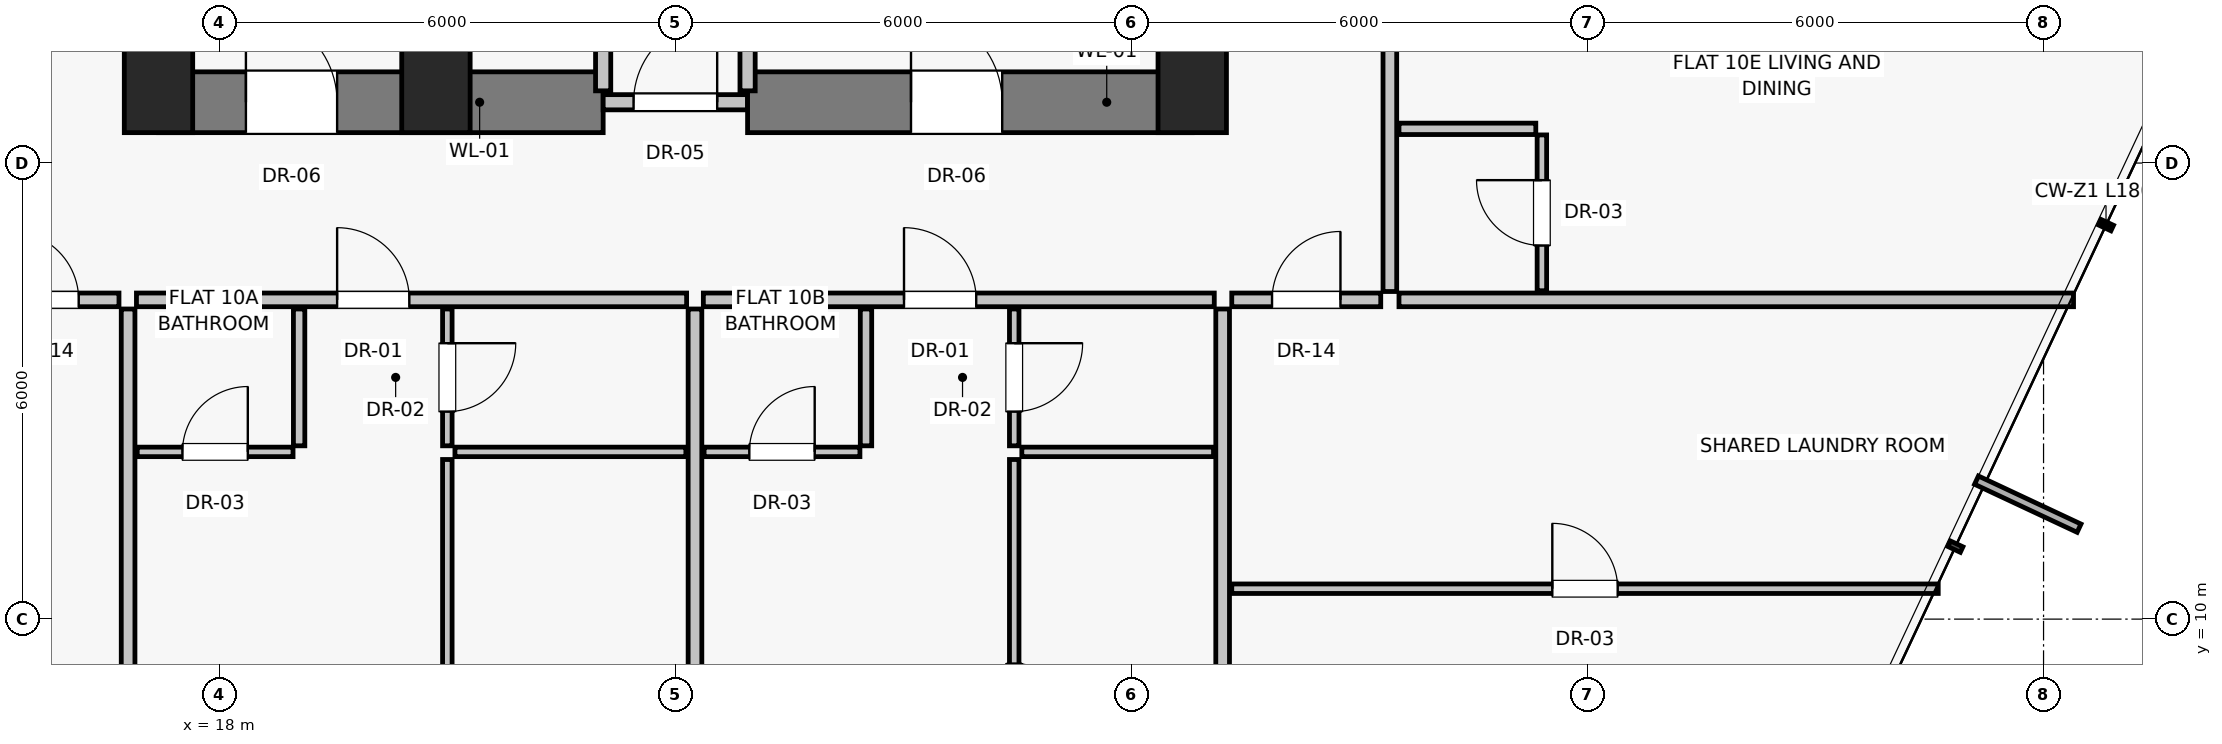
"""IFC4 building model, lengths in metres.
Left out: names, types, materials, properties, quantities, classifications, styles, units other than length and angle.
Written with IfcOpenShell. Run it as: python <this file> out.ifc"""

import sys

from ifc_helpers import new_model, si_unit, direction, frame, frame_2d, origin, origin_2d, place, context, subcontext, project, spatial, rectangle, extrude, source, transform, mapped, element, fill, save


model = new_model("IFC4")
c1 = context("Model", 3, precision=1e-05, world=origin(), true_north=direction((0.0, 1.0)))
c2 = subcontext(c1, "Body", "Model", "MODEL_VIEW")
j1 = project(units=[si_unit("LENGTHUNIT", "METRE"), si_unit("PLANEANGLEUNIT", "RADIAN")], contexts=[c1])
p1 = place(None, origin())
s1 = spatial("IfcSite", under=j1, at=p1, CompositionType="ELEMENT")
p2 = place(p1, origin())
s2 = spatial("IfcBuilding", under=s1, at=p2, CompositionType="ELEMENT")
p3 = place(p2, frame((0.0, 0.0, 40.3)))
s3 = spatial("IfcBuildingStorey", under=s2, at=p3, CompositionType="ELEMENT", Elevation=40.3)
for number, where, z_axis, x_axis in (
    (1, (17.2, 17.0, 0.0), (0.0, 0.0, 1.0), (1.0, 0.0, 0.0)),
    (2, (20.85, 17.0, 0.0), (0.0, 0.0, 1.0), (1.0, 0.0, 0.0)),
    (3, (30.8, 17.0, 0.0), (0.0, 0.0, 1.0), (1.0, 0.0, 0.0)),
):
    element("IfcColumn", number, at=place(p3, frame(where, z_axis=z_axis, x_axis=x_axis)), inside=s3, PredefinedType="PILASTER", context=c2, shape_type="SweptSolid", body=[
        extrude(rectangle(XDim=0.9, YDim=1.2, at=origin_2d()), origin(), (0.0, 0.0, 1.0), 3.25),
    ])
for number, where, z_axis, x_axis in (
    (4, (17.2, 16.8, 0.0), (0.0, 0.0, 1.0), (0.0, 1.0, 0.0)),
    (5, (30.8, 16.8, 0.0), (0.0, 0.0, 1.0), (0.0, 1.0, 0.0)),
):
    element("IfcWall", number, at=place(p3, frame(where, z_axis=z_axis, x_axis=x_axis)), inside=s3, PredefinedType="SHEAR", context=c2, shape_type="SweptSolid", body=[
        extrude(rectangle(XDim=14.2, YDim=0.8, at=frame_2d((7.1, 0.0))), origin(), (0.0, 0.0, 1.0), 3.0),
    ])
p4 = place(p3, frame((17.2, 16.8, 0.0), z_axis=(0.0, 0.0, 1.0), x_axis=(1.0, 0.0, 0.0)))
e6 = element("IfcWall", 6, at=p4, inside=s3, PredefinedType="SHEAR", context=c2, shape_type="SweptSolid", body=[
    extrude(rectangle(XDim=5.85, YDim=0.8, at=frame_2d((2.925, 0.0))), origin(), (0.0, 0.0, 1.0), 3.0),
])
p5 = place(p4, frame((1.15, 0.0, 0.0)))
e7 = element("IfcOpeningElement", 7, at=p5, cuts=e6, PredefinedType="OPENING", context=c2, shape_type="SweptSolid", body=[
    extrude(rectangle(XDim=1.2, YDim=2.03, at=frame_2d((0.6, 1.015))), frame((0.0, 0.41, 0.0), z_axis=(0.0, -1.0, 0.0), x_axis=(1.0, 0.0, 0.0)), (0.0, 0.0, 1.0), 0.82),
])
p6 = place(p3, frame((23.05, 16.8, 0.0), z_axis=(0.0, 0.0, 1.0), x_axis=(1.0, 0.0, 0.0)))
e8 = element("IfcWall", 8, at=p6, inside=s3, PredefinedType="SOLIDWALL", context=c2, shape_type="SweptSolid", body=[
    extrude(rectangle(XDim=1.9, YDim=0.2, at=frame_2d((0.95, 0.0))), origin(), (0.0, 0.0, 1.0), 2.15),
])
p7 = place(p6, frame((0.4, 0.0, 0.0)))
e9 = element("IfcOpeningElement", 9, at=p7, cuts=e8, PredefinedType="OPENING", context=c2, shape_type="SweptSolid", body=[
    extrude(rectangle(XDim=1.1, YDim=2.03, at=frame_2d((0.55, 1.015))), frame((0.0, 0.11, 0.0), z_axis=(0.0, -1.0, 0.0), x_axis=(1.0, 0.0, 0.0)), (0.0, 0.0, 1.0), 0.22),
])
p8 = place(p3, frame((24.95, 16.8, 0.0), z_axis=(0.0, 0.0, 1.0), x_axis=(1.0, 0.0, 0.0)))
e10 = element("IfcWall", 10, at=p8, inside=s3, PredefinedType="SHEAR", context=c2, shape_type="SweptSolid", body=[
    extrude(rectangle(XDim=5.85, YDim=0.8, at=frame_2d((2.925, 0.0))), origin(), (0.0, 0.0, 1.0), 3.0),
])
p9 = place(p8, frame((2.15, 0.0, 0.0)))
e11 = element("IfcOpeningElement", 11, at=p9, cuts=e10, PredefinedType="OPENING", context=c2, shape_type="SweptSolid", body=[
    extrude(rectangle(XDim=1.2, YDim=2.03, at=frame_2d((0.6, 1.015))), frame((0.0, 0.41, 0.0), z_axis=(0.0, -1.0, 0.0), x_axis=(1.0, 0.0, 0.0)), (0.0, 0.0, 1.0), 0.82),
])
for number, where, z_axis, x_axis in (
    (12, (23.05, 16.95, 0.0), (0.0, 0.0, 1.0), (0.0, 1.0, 0.0)),
    (13, (24.95, 16.95, 0.0), (0.0, 0.0, 1.0), (0.0, 1.0, 0.0)),
):
    element("IfcWall", number, at=place(p3, frame(where, z_axis=z_axis, x_axis=x_axis)), inside=s3, PredefinedType="SOLIDWALL", context=c2, shape_type="SweptSolid", body=[
        extrude(rectangle(XDim=5.6, YDim=0.2, at=frame_2d((2.8, 0.0))), origin(), (0.0, 0.0, 1.0), 3.0),
    ])
p10 = place(p3, frame((16.8, 14.08, 0.0), z_axis=(0.0, 0.0, 1.0), x_axis=(0.0, -1.0, 0.0)))
e14 = element("IfcWall", 14, at=p10, inside=s3, PredefinedType="PARTITIONING", context=c2, shape_type="SweptSolid", body=[
    extrude(rectangle(XDim=11.588, YDim=0.18, at=frame_2d((5.794, 0.0))), origin(), (0.0, 0.0, 1.0), 3.0),
])
p11 = place(p3, frame((31.2, 14.08, 0.0), z_axis=(0.0, 0.0, 1.0), x_axis=(0.0, -1.0, 0.0)))
e15 = element("IfcWall", 15, at=p11, inside=s3, PredefinedType="PARTITIONING", context=c2, shape_type="SweptSolid", body=[
    extrude(rectangle(XDim=10.354, YDim=0.18, at=frame_2d((5.177, 0.0))), origin(), (0.0, 0.0, 1.0), 3.0),
])
p12 = place(p3, frame((16.91, 14.2, 0.0), z_axis=(0.0, 0.0, 1.0), x_axis=(1.0, 0.0, 0.0)))
e16 = element("IfcWall", 16, at=p12, inside=s3, PredefinedType="PARTITIONING", context=c2, shape_type="SweptSolid", body=[
    extrude(rectangle(XDim=7.238, YDim=0.18, at=frame_2d((3.619, 0.0))), origin(), (0.0, 0.0, 1.0), 3.0),
])
p13 = place(p12, frame((2.64, 0.0, 0.0)))
e17 = element("IfcOpeningElement", 17, at=p13, cuts=e16, PredefinedType="OPENING", context=c2, shape_type="SweptSolid", body=[
    extrude(rectangle(XDim=0.95, YDim=2.02, at=frame_2d((0.475, 1.01))), frame((0.0, 0.1, 0.0), z_axis=(0.0, -1.0, 0.0), x_axis=(1.0, 0.0, 0.0)), (0.0, 0.0, 1.0), 0.2),
])
p14 = place(p3, frame((19.05, 14.08, 0.0), z_axis=(0.0, 0.0, 1.0), x_axis=(0.0, -1.0, 0.0)))
e18 = element("IfcWall", 18, at=p14, inside=s3, PredefinedType="PARTITIONING", context=c2, shape_type="SweptSolid", body=[
    extrude(rectangle(XDim=1.8, YDim=0.15, at=frame_2d((0.9, 0.0))), origin(), (0.0, 0.0, 1.0), 3.0),
])
p15 = place(p3, frame((16.92, 12.2, 0.0), z_axis=(0.0, 0.0, 1.0), x_axis=(1.0, 0.0, 0.0)))
e19 = element("IfcWall", 19, at=p15, inside=s3, PredefinedType="PARTITIONING", context=c2, shape_type="SweptSolid", body=[
    extrude(rectangle(XDim=2.05, YDim=0.125, at=frame_2d((1.025, 0.0))), origin(), (0.0, 0.0, 1.0), 3.0),
])
p16 = place(p15, frame((0.595, 0.0, 0.0)))
e20 = element("IfcOpeningElement", 20, at=p16, cuts=e19, PredefinedType="OPENING", context=c2, shape_type="SweptSolid", body=[
    extrude(rectangle(XDim=0.86, YDim=2.01, at=frame_2d((0.43, 1.005))), frame((0.0, 0.073, 0.0), z_axis=(0.0, -1.0, 0.0), x_axis=(1.0, 0.0, 0.0)), (0.0, 0.0, 1.0), 0.145),
])
p17 = place(p3, frame((21.0, 14.08, 0.0), z_axis=(0.0, 0.0, 1.0), x_axis=(0.0, -1.0, 0.0)))
e21 = element("IfcWall", 21, at=p17, inside=s3, PredefinedType="PARTITIONING", context=c2, shape_type="SweptSolid", body=[
    extrude(rectangle(XDim=1.8, YDim=0.125, at=frame_2d((0.9, 0.0))), origin(), (0.0, 0.0, 1.0), 3.0),
])
p18 = place(p17, frame((0.45, 0.0, 0.0)))
e22 = element("IfcOpeningElement", 22, at=p18, cuts=e21, PredefinedType="OPENING", context=c2, shape_type="SweptSolid", body=[
    extrude(rectangle(XDim=0.9, YDim=2.01, at=frame_2d((0.45, 1.005))), frame((0.0, 0.073, 0.0), z_axis=(0.0, -1.0, 0.0), x_axis=(1.0, 0.0, 0.0)), (0.0, 0.0, 1.0), 0.145),
])
p19 = place(p3, frame((21.1, 12.2, 0.0), z_axis=(0.0, 0.0, 1.0), x_axis=(1.0, 0.0, 0.0)))
e23 = element("IfcWall", 23, at=p19, inside=s3, PredefinedType="PARTITIONING", context=c2, shape_type="SweptSolid", body=[
    extrude(rectangle(XDim=3.038, YDim=0.125, at=frame_2d((1.519, 0.0))), origin(), (0.0, 0.0, 1.0), 3.0),
])
p20 = place(p3, frame((21.0, 12.1, 0.0), z_axis=(0.0, 0.0, 1.0), x_axis=(0.0, -1.0, 0.0)))
e24 = element("IfcWall", 24, at=p20, inside=s3, PredefinedType="PARTITIONING", context=c2, shape_type="SweptSolid", body=[
    extrude(rectangle(XDim=9.248, YDim=0.125, at=frame_2d((4.624, 0.0))), origin(), (0.0, 0.0, 1.0), 3.0),
])
p21 = place(p20, frame((2.902, 0.0, 0.0)))
e25 = element("IfcOpeningElement", 25, at=p21, cuts=e24, PredefinedType="OPENING", context=c2, shape_type="SweptSolid", body=[
    extrude(rectangle(XDim=0.9, YDim=2.01, at=frame_2d((0.45, 1.005))), frame((0.0, 0.073, 0.0), z_axis=(0.0, -1.0, 0.0), x_axis=(1.0, 0.0, 0.0)), (0.0, 0.0, 1.0), 0.145),
])
p22 = place(p3, frame((24.258, 14.08, 0.0), z_axis=(0.0, 0.0, 1.0), x_axis=(0.0, -1.0, 0.0)))
e26 = element("IfcWall", 26, at=p22, inside=s3, PredefinedType="PARTITIONING", context=c2, shape_type="SweptSolid", body=[
    extrude(rectangle(XDim=10.949, YDim=0.18, at=frame_2d((5.475, 0.0))), origin(), (0.0, 0.0, 1.0), 3.0),
])
p23 = place(p3, frame((24.368, 14.2, 0.0), z_axis=(0.0, 0.0, 1.0), x_axis=(1.0, 0.0, 0.0)))
e27 = element("IfcWall", 27, at=p23, inside=s3, PredefinedType="PARTITIONING", context=c2, shape_type="SweptSolid", body=[
    extrude(rectangle(XDim=6.722, YDim=0.18, at=frame_2d((3.361, 0.0))), origin(), (0.0, 0.0, 1.0), 3.0),
])
p24 = place(p23, frame((2.64, 0.0, 0.0)))
e28 = element("IfcOpeningElement", 28, at=p24, cuts=e27, PredefinedType="OPENING", context=c2, shape_type="SweptSolid", body=[
    extrude(rectangle(XDim=0.95, YDim=2.02, at=frame_2d((0.475, 1.01))), frame((0.0, 0.1, 0.0), z_axis=(0.0, -1.0, 0.0), x_axis=(1.0, 0.0, 0.0)), (0.0, 0.0, 1.0), 0.2),
])
p25 = place(p3, frame((26.508, 14.08, 0.0), z_axis=(0.0, 0.0, 1.0), x_axis=(0.0, -1.0, 0.0)))
e29 = element("IfcWall", 29, at=p25, inside=s3, PredefinedType="PARTITIONING", context=c2, shape_type="SweptSolid", body=[
    extrude(rectangle(XDim=1.8, YDim=0.15, at=frame_2d((0.9, 0.0))), origin(), (0.0, 0.0, 1.0), 3.0),
])
p26 = place(p3, frame((24.378, 12.2, 0.0), z_axis=(0.0, 0.0, 1.0), x_axis=(1.0, 0.0, 0.0)))
e30 = element("IfcWall", 30, at=p26, inside=s3, PredefinedType="PARTITIONING", context=c2, shape_type="SweptSolid", body=[
    extrude(rectangle(XDim=2.05, YDim=0.125, at=frame_2d((1.025, 0.0))), origin(), (0.0, 0.0, 1.0), 3.0),
])
p27 = place(p26, frame((0.595, 0.0, 0.0)))
e31 = element("IfcOpeningElement", 31, at=p27, cuts=e30, PredefinedType="OPENING", context=c2, shape_type="SweptSolid", body=[
    extrude(rectangle(XDim=0.86, YDim=2.01, at=frame_2d((0.43, 1.005))), frame((0.0, 0.073, 0.0), z_axis=(0.0, -1.0, 0.0), x_axis=(1.0, 0.0, 0.0)), (0.0, 0.0, 1.0), 0.145),
])
p28 = place(p3, frame((28.458, 14.08, 0.0), z_axis=(0.0, 0.0, 1.0), x_axis=(0.0, -1.0, 0.0)))
e32 = element("IfcWall", 32, at=p28, inside=s3, PredefinedType="PARTITIONING", context=c2, shape_type="SweptSolid", body=[
    extrude(rectangle(XDim=1.8, YDim=0.125, at=frame_2d((0.9, 0.0))), origin(), (0.0, 0.0, 1.0), 3.0),
])
p29 = place(p28, frame((0.45, 0.0, 0.0)))
e33 = element("IfcOpeningElement", 33, at=p29, cuts=e32, PredefinedType="OPENING", context=c2, shape_type="SweptSolid", body=[
    extrude(rectangle(XDim=0.9, YDim=2.01, at=frame_2d((0.45, 1.005))), frame((0.0, 0.073, 0.0), z_axis=(0.0, -1.0, 0.0), x_axis=(1.0, 0.0, 0.0)), (0.0, 0.0, 1.0), 0.145),
])
p30 = place(p3, frame((28.558, 12.2, 0.0), z_axis=(0.0, 0.0, 1.0), x_axis=(1.0, 0.0, 0.0)))
e34 = element("IfcWall", 34, at=p30, inside=s3, PredefinedType="PARTITIONING", context=c2, shape_type="SweptSolid", body=[
    extrude(rectangle(XDim=2.522, YDim=0.125, at=frame_2d((1.261, 0.0))), origin(), (0.0, 0.0, 1.0), 3.0),
])
p31 = place(p3, frame((28.458, 12.1, 0.0), z_axis=(0.0, 0.0, 1.0), x_axis=(0.0, -1.0, 0.0)))
e35 = element("IfcWall", 35, at=p31, inside=s3, PredefinedType="PARTITIONING", context=c2, shape_type="SweptSolid", body=[
    extrude(rectangle(XDim=8.609, YDim=0.125, at=frame_2d((4.304, 0.0))), origin(), (0.0, 0.0, 1.0), 3.0),
])
p32 = place(p31, frame((2.685, 0.0, 0.0)))
e36 = element("IfcOpeningElement", 36, at=p32, cuts=e35, PredefinedType="OPENING", context=c2, shape_type="SweptSolid", body=[
    extrude(rectangle(XDim=0.9, YDim=2.01, at=frame_2d((0.45, 1.005))), frame((0.0, 0.073, 0.0), z_axis=(0.0, -1.0, 0.0), x_axis=(1.0, 0.0, 0.0)), (0.0, 0.0, 1.0), 0.145),
])
p33 = place(p3, frame((33.52, 14.2, 0.0), z_axis=(0.0, 0.0, 1.0), x_axis=(1.0, 0.0, 0.0)))
e37 = element("IfcWall", 37, at=p33, inside=s3, PredefinedType="PARTITIONING", context=c2, shape_type="SweptSolid", body=[
    extrude(rectangle(XDim=8.875, YDim=0.18, at=frame_2d((4.437, 0.0))), origin(), (0.0, 0.0, 1.0), 3.0),
])
p34 = place(p3, frame((33.4, 14.31, 0.0), z_axis=(0.0, 0.0, 1.0), x_axis=(0.0, 1.0, 0.0)))
e38 = element("IfcWall", 38, at=p34, inside=s3, PredefinedType="PARTITIONING", context=c2, shape_type="SweptSolid", body=[
    extrude(rectangle(XDim=10.088, YDim=0.18, at=frame_2d((5.044, 0.0))), origin(), (0.0, 0.0, 1.0), 3.0),
])
p35 = place(p34, frame((3.426, 0.0, 0.0)))
e39 = element("IfcOpeningElement", 39, at=p35, cuts=e38, PredefinedType="OPENING", context=c2, shape_type="SweptSolid", body=[
    extrude(rectangle(XDim=0.95, YDim=2.02, at=frame_2d((0.475, 1.01))), frame((0.0, 0.1, 0.0), z_axis=(0.0, -1.0, 0.0), x_axis=(1.0, 0.0, 0.0)), (0.0, 0.0, 1.0), 0.2),
])
p36 = place(p3, frame((33.52, 16.45, 0.0), z_axis=(0.0, 0.0, 1.0), x_axis=(1.0, 0.0, 0.0)))
e40 = element("IfcWall", 40, at=p36, inside=s3, PredefinedType="PARTITIONING", context=c2, shape_type="SweptSolid", body=[
    extrude(rectangle(XDim=1.8, YDim=0.15, at=frame_2d((0.9, 0.0))), origin(), (0.0, 0.0, 1.0), 3.0),
])
p37 = place(p3, frame((35.4, 14.32, 0.0), z_axis=(0.0, 0.0, 1.0), x_axis=(0.0, 1.0, 0.0)))
e41 = element("IfcWall", 41, at=p37, inside=s3, PredefinedType="PARTITIONING", context=c2, shape_type="SweptSolid", body=[
    extrude(rectangle(XDim=2.05, YDim=0.125, at=frame_2d((1.025, 0.0))), origin(), (0.0, 0.0, 1.0), 3.0),
])
p38 = place(p37, frame((0.595, 0.0, 0.0)))
e42 = element("IfcOpeningElement", 42, at=p38, cuts=e41, PredefinedType="OPENING", context=c2, shape_type="SweptSolid", body=[
    extrude(rectangle(XDim=0.86, YDim=2.01, at=frame_2d((0.43, 1.005))), frame((0.0, 0.073, 0.0), z_axis=(0.0, -1.0, 0.0), x_axis=(1.0, 0.0, 0.0)), (0.0, 0.0, 1.0), 0.145),
])
p39 = place(p3, frame((14.72, 14.2, 0.0), z_axis=(0.0, 0.0, 1.0), x_axis=(1.0, 0.0, 0.0)))
e43 = element("IfcWall", 43, at=p39, inside=s3, PredefinedType="PARTITIONING", context=c2, shape_type="SweptSolid", body=[
    extrude(rectangle(XDim=1.96, YDim=0.18, at=frame_2d((0.98, 0.0))), origin(), (0.0, 0.0, 1.0), 3.0),
])
p40 = place(p39, frame((0.53, 0.0, 0.0)))
e44 = element("IfcOpeningElement", 44, at=p40, cuts=e43, PredefinedType="OPENING", context=c2, shape_type="SweptSolid", body=[
    extrude(rectangle(XDim=0.9, YDim=2.01, at=frame_2d((0.45, 1.005))), frame((0.0, 0.1, 0.0), z_axis=(0.0, -1.0, 0.0), x_axis=(1.0, 0.0, 0.0)), (0.0, 0.0, 1.0), 0.2),
])
p41 = place(p3, frame((31.32, 14.2, 0.0), z_axis=(0.0, 0.0, 1.0), x_axis=(1.0, 0.0, 0.0)))
e45 = element("IfcWall", 45, at=p41, inside=s3, PredefinedType="PARTITIONING", context=c2, shape_type="SweptSolid", body=[
    extrude(rectangle(XDim=1.96, YDim=0.18, at=frame_2d((0.98, 0.0))), origin(), (0.0, 0.0, 1.0), 3.0),
])
p42 = place(p41, frame((0.53, 0.0, 0.0)))
e46 = element("IfcOpeningElement", 46, at=p42, cuts=e45, PredefinedType="OPENING", context=c2, shape_type="SweptSolid", body=[
    extrude(rectangle(XDim=0.9, YDim=2.01, at=frame_2d((0.45, 1.005))), frame((0.0, 0.1, 0.0), z_axis=(0.0, -1.0, 0.0), x_axis=(1.0, 0.0, 0.0)), (0.0, 0.0, 1.0), 0.2),
])
p43 = place(p3, frame((31.32, 10.4, 0.0), z_axis=(0.0, 0.0, 1.0), x_axis=(1.0, 0.0, 0.0)))
e47 = element("IfcWall", 47, at=p43, inside=s3, PredefinedType="PARTITIONING", context=c2, shape_type="SweptSolid", body=[
    extrude(rectangle(XDim=9.294, YDim=0.125, at=frame_2d((4.647, 0.0))), origin(), (0.0, 0.0, 1.0), 3.0),
])
p44 = place(p43, frame((4.217, 0.0, 0.0)))
e48 = element("IfcOpeningElement", 48, at=p44, cuts=e47, PredefinedType="OPENING", context=c2, shape_type="SweptSolid", body=[
    extrude(rectangle(XDim=0.86, YDim=2.01, at=frame_2d((0.43, 1.005))), frame((0.0, 0.073, 0.0), z_axis=(0.0, -1.0, 0.0), x_axis=(1.0, 0.0, 0.0)), (0.0, 0.0, 1.0), 0.145),
])
m1 = source(origin(), c2, "Body", "SweptSolid", [
    extrude(rectangle(XDim=1.2, YDim=2.03, at=frame_2d((0.6, 1.015))), frame((0.0, 0.025, 0.0), z_axis=(0.0, -1.0, 0.0), x_axis=(1.0, 0.0, 0.0)), (0.0, 0.0, 1.0), 0.05),
])
p45 = place(p5, origin())
e49 = element("IfcDoor", 49, at=p45, inside=s3, OperationType="SINGLE_SWING_LEFT", PredefinedType="DOOR", context=c2, shape_type="MappedRepresentation", body=[
    mapped(m1, transform((0.0, 0.0, 0.0), scale=1.0)),
])
fill(e7, e49)
m2 = source(origin(), c2, "Body", "SweptSolid", [
    extrude(rectangle(XDim=1.1, YDim=2.03, at=frame_2d((0.55, 1.015))), frame((0.0, 0.025, 0.0), z_axis=(0.0, -1.0, 0.0), x_axis=(1.0, 0.0, 0.0)), (0.0, 0.0, 1.0), 0.05),
])
p46 = place(p7, origin())
e50 = element("IfcDoor", 50, at=p46, inside=s3, OperationType="SINGLE_SWING_RIGHT", PredefinedType="DOOR", context=c2, shape_type="MappedRepresentation", body=[
    mapped(m2, transform((0.0, 0.0, 0.0), scale=1.0)),
])
fill(e9, e50)
p47 = place(p9, origin())
e51 = element("IfcDoor", 51, at=p47, inside=s3, OperationType="SINGLE_SWING_LEFT", PredefinedType="DOOR", context=c2, shape_type="MappedRepresentation", body=[
    mapped(m1, transform((0.0, 0.0, 0.0), scale=1.0)),
])
fill(e11, e51)
m3 = source(origin(), c2, "Body", "SweptSolid", [
    extrude(rectangle(XDim=0.95, YDim=2.02, at=frame_2d((0.475, 1.01))), frame((0.0, 0.025, 0.0), z_axis=(0.0, -1.0, 0.0), x_axis=(1.0, 0.0, 0.0)), (0.0, 0.0, 1.0), 0.05),
])
p48 = place(p13, origin())
e52 = element("IfcDoor", 52, at=p48, inside=s3, OperationType="SINGLE_SWING_LEFT", PredefinedType="DOOR", context=c2, shape_type="MappedRepresentation", body=[
    mapped(m3, transform((0.0, 0.0, 0.0), scale=1.0)),
])
fill(e17, e52)
m4 = source(origin(), c2, "Body", "SweptSolid", [
    extrude(rectangle(XDim=0.86, YDim=2.01, at=frame_2d((0.43, 1.005))), frame((0.0, 0.025, 0.0), z_axis=(0.0, -1.0, 0.0), x_axis=(1.0, 0.0, 0.0)), (0.0, 0.0, 1.0), 0.05),
])
p49 = place(p16, origin())
e53 = element("IfcDoor", 53, at=p49, inside=s3, OperationType="SINGLE_SWING_RIGHT", PredefinedType="DOOR", context=c2, shape_type="MappedRepresentation", body=[
    mapped(m4, transform((0.0, 0.0, 0.0), scale=1.0)),
])
fill(e20, e53)
m5 = source(origin(), c2, "Body", "SweptSolid", [
    extrude(rectangle(XDim=0.9, YDim=2.01, at=frame_2d((0.45, 1.005))), frame((0.0, 0.025, 0.0), z_axis=(0.0, -1.0, 0.0), x_axis=(1.0, 0.0, 0.0)), (0.0, 0.0, 1.0), 0.05),
])
p50 = place(p18, origin())
e54 = element("IfcDoor", 54, at=p50, inside=s3, OperationType="SINGLE_SWING_LEFT", PredefinedType="DOOR", context=c2, shape_type="MappedRepresentation", body=[
    mapped(m5, transform((0.0, 0.0, 0.0), scale=1.0)),
])
fill(e22, e54)
p51 = place(p24, origin())
e55 = element("IfcDoor", 55, at=p51, inside=s3, OperationType="SINGLE_SWING_LEFT", PredefinedType="DOOR", context=c2, shape_type="MappedRepresentation", body=[
    mapped(m3, transform((0.0, 0.0, 0.0), scale=1.0)),
])
fill(e28, e55)
p52 = place(p27, origin())
e56 = element("IfcDoor", 56, at=p52, inside=s3, OperationType="SINGLE_SWING_RIGHT", PredefinedType="DOOR", context=c2, shape_type="MappedRepresentation", body=[
    mapped(m4, transform((0.0, 0.0, 0.0), scale=1.0)),
])
fill(e31, e56)
p53 = place(p29, origin())
e57 = element("IfcDoor", 57, at=p53, inside=s3, OperationType="SINGLE_SWING_LEFT", PredefinedType="DOOR", context=c2, shape_type="MappedRepresentation", body=[
    mapped(m5, transform((0.0, 0.0, 0.0), scale=1.0)),
])
fill(e33, e57)
p54 = place(p32, origin())
e58 = element("IfcDoor", 58, at=p54, inside=s3, OperationType="SINGLE_SWING_RIGHT", PredefinedType="DOOR", context=c2, shape_type="MappedRepresentation", body=[
    mapped(m5, transform((0.0, 0.0, 0.0), scale=1.0)),
])
fill(e36, e58)
p55 = place(p38, origin())
e59 = element("IfcDoor", 59, at=p55, inside=s3, OperationType="SINGLE_SWING_RIGHT", PredefinedType="DOOR", context=c2, shape_type="MappedRepresentation", body=[
    mapped(m4, transform((0.0, 0.0, 0.0), scale=1.0)),
])
fill(e42, e59)
p56 = place(p40, origin())
e60 = element("IfcDoor", 60, at=p56, inside=s3, OperationType="SINGLE_SWING_LEFT", PredefinedType="DOOR", context=c2, shape_type="MappedRepresentation", body=[
    mapped(m5, transform((0.0, 0.0, 0.0), scale=1.0)),
])
fill(e44, e60)
p57 = place(p42, origin())
e61 = element("IfcDoor", 61, at=p57, inside=s3, OperationType="SINGLE_SWING_RIGHT", PredefinedType="DOOR", context=c2, shape_type="MappedRepresentation", body=[
    mapped(m5, transform((0.0, 0.0, 0.0), scale=1.0)),
])
fill(e46, e61)
p58 = place(p44, origin())
e62 = element("IfcDoor", 62, at=p58, inside=s3, OperationType="SINGLE_SWING_LEFT", PredefinedType="DOOR", context=c2, shape_type="MappedRepresentation", body=[
    mapped(m4, transform((0.0, 0.0, 0.0), scale=1.0)),
])
fill(e48, e62)
save(model, sys.argv[1])
